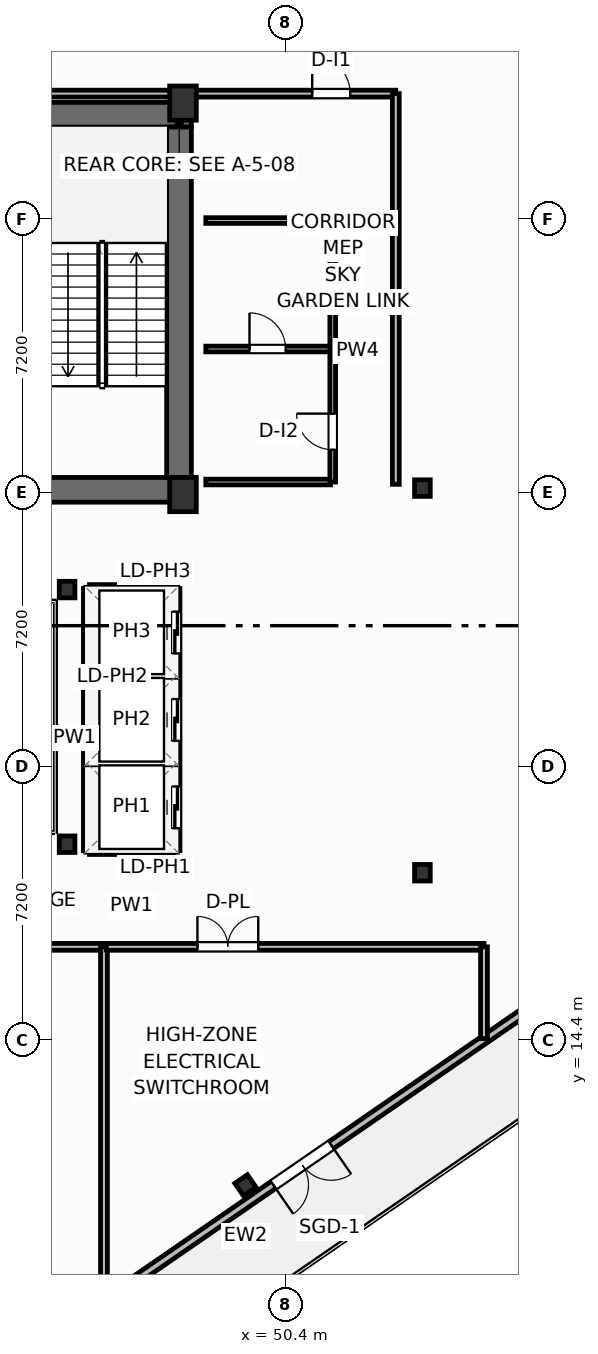
"""IFC4 building model, lengths in metres.
Left out: names, types, materials, properties, quantities, classifications, styles, units other than length and angle.
Written with IfcOpenShell. Run it as: python <this file> out.ifc"""

import sys

from ifc_helpers import new_model, si_unit, direction, frame, frame_2d, origin, origin_2d, place, context, subcontext, project, spatial, rectangle, i_section, extrude, element, fill, save


model = new_model("IFC4")
c1 = context("Model", 3, precision=1e-05, world=origin(), true_north=direction((0.0, 1.0)))
c2 = subcontext(c1, "Body", "Model", "MODEL_VIEW")
j1 = project(units=[si_unit("LENGTHUNIT", "METRE"), si_unit("PLANEANGLEUNIT", "RADIAN")], contexts=[c1])
p1 = place(None, origin())
s1 = spatial("IfcSite", under=j1, at=p1, CompositionType="ELEMENT")
p2 = place(p1, origin())
s2 = spatial("IfcBuilding", under=s1, at=p2, CompositionType="ELEMENT")
p3 = place(p2, frame((0.0, 0.0, 253.4)))
s3 = spatial("IfcBuildingStorey", under=s2, at=p3, CompositionType="ELEMENT", Elevation=253.4)
for number, where, z_axis, x_axis in (
    (1, (47.7, 28.75, 0.0), (0.0, 0.0, 1.0), (1.0, 0.0, 0.0)),
    (2, (47.7, 39.05, 0.0), (0.0, 0.0, 1.0), (1.0, 0.0, 0.0)),
):
    element("IfcColumn", number, at=place(p3, frame(where, z_axis=z_axis, x_axis=x_axis)), inside=s3, PredefinedType="COLUMN", context=c2, shape_type="SweptSolid", body=[
        extrude(rectangle(XDim=0.7, YDim=0.9, at=origin_2d()), origin(), (0.0, 0.0, 1.0), 4.8),
    ])
for number, where, z_axis, x_axis in (
    (3, (44.65, 19.55, 0.0), (0.0, 0.0, 1.0), (1.0, 0.0, 0.0)),
    (4, (44.65, 26.25, 0.0), (0.0, 0.0, 1.0), (1.0, 0.0, 0.0)),
    (5, (54.0, 18.8, 0.0), (0.0, 0.0, 1.0), (1.0, 0.0, 0.0)),
    (6, (54.0, 28.92, 0.0), (0.0, 0.0, 1.0), (1.0, 0.0, 0.0)),
):
    element("IfcColumn", number, at=place(p3, frame(where, z_axis=z_axis, x_axis=x_axis)), inside=s3, PredefinedType="COLUMN", context=c2, shape_type="SweptSolid", body=[
        extrude(i_section(OverallWidth=0.412, OverallDepth=0.435, WebThickness=0.036, FlangeThickness=0.057, FilletRadius=0.025, at=origin_2d()), origin(), (0.0, 0.0, 1.0), 4.8),
    ])
p4 = place(p3, frame((30.48, 38.745, 0.0), z_axis=(0.0, 0.0, 1.0), x_axis=(1.0, 0.0, 0.0)))
e7 = element("IfcWall", 7, at=p4, inside=s3, PredefinedType="SHEAR", context=c2, shape_type="SweptSolid", body=[
    extrude(rectangle(XDim=17.44, YDim=0.65, at=frame_2d((8.72, 0.0))), origin(), (0.0, 0.0, 1.0), 4.55),
])
p5 = place(p3, frame((47.595, 29.2, 0.0), z_axis=(0.0, 0.0, 1.0), x_axis=(0.0, 1.0, 0.0)))
e8 = element("IfcWall", 8, at=p5, inside=s3, PredefinedType="SHEAR", context=c2, shape_type="SweptSolid", body=[
    extrude(rectangle(XDim=9.22, YDim=0.65, at=frame_2d((4.61, 0.0))), origin(), (0.0, 0.0, 1.0), 4.55),
])
p6 = place(p3, frame((43.6, 28.875, 0.0), z_axis=(0.0, 0.0, 1.0), x_axis=(1.0, 0.0, 0.0)))
e9 = element("IfcWall", 9, at=p6, inside=s3, PredefinedType="SHEAR", context=c2, shape_type="SweptSolid", body=[
    extrude(rectangle(XDim=4.32, YDim=0.65, at=frame_2d((2.16, 0.0))), origin(), (0.0, 0.0, 1.0), 4.55),
])
p7 = place(p3, frame((49.343, 10.575, -0.32), z_axis=(0.0, 0.0, 1.0), x_axis=(0.823532597628, 0.567268949127, 0.0)))
e10 = element("IfcColumn", 10, at=p7, inside=s3, PredefinedType="COLUMN", context=c2, shape_type="SweptSolid", body=[
    extrude(i_section(OverallWidth=0.401, OverallDepth=0.399, WebThickness=0.025, FlangeThickness=0.04, FilletRadius=0.022, at=origin_2d()), origin(), (0.0, 0.0, 1.0), 5.12),
])
p8 = place(p3, frame((71.07, 25.043, 0.0), z_axis=(0.0, 0.0, 1.0), x_axis=(-0.82353435434, -0.567266398812, 0.0)))
e11 = element("IfcWall", 11, at=p8, inside=s3, PredefinedType="SOLIDWALL", context=c2, shape_type="SweptSolid", body=[
    extrude(rectangle(XDim=52.2, YDim=0.22, at=frame_2d((26.1, 0.0))), origin(), (0.0, 0.0, 1.0), 3.83),
])
p9 = place(p8, frame((23.64, 0.0, 0.0)))
e12 = element("IfcOpeningElement", 12, at=p9, cuts=e11, PredefinedType="OPENING", context=c2, shape_type="SweptSolid", body=[
    extrude(rectangle(XDim=1.85, YDim=2.3, at=frame_2d((0.925, 1.15))), frame((0.0, 0.12, 0.0), z_axis=(0.0, -1.0, 0.0), x_axis=(1.0, 0.0, 0.0)), (0.0, 0.0, 1.0), 0.24),
])
p10 = place(p8, frame((0.55, 0.0, 0.75)))
e13 = element("IfcOpeningElement", 13, at=p10, cuts=e11, PredefinedType="OPENING", context=c2, shape_type="SweptSolid", body=[
    extrude(rectangle(XDim=1.85, YDim=1.75, at=frame_2d((0.925, 0.875))), frame((0.0, 0.12, 0.0), z_axis=(0.0, -1.0, 0.0), x_axis=(1.0, 0.0, 0.0)), (0.0, 0.0, 1.0), 0.24),
])
p11 = place(p8, frame((49.8, 0.0, 0.75)))
e14 = element("IfcOpeningElement", 14, at=p11, cuts=e11, PredefinedType="OPENING", context=c2, shape_type="SweptSolid", body=[
    extrude(rectangle(XDim=1.85, YDim=1.75, at=frame_2d((0.925, 0.875))), frame((0.0, 0.12, 0.0), z_axis=(0.0, -1.0, 0.0), x_axis=(1.0, 0.0, 0.0)), (0.0, 0.0, 1.0), 0.24),
])
p12 = place(p3, frame((7.331, 25.557, 0.0), z_axis=(0.0, 0.0, 1.0), x_axis=(0.823530664362, 0.567271755735, 0.0)))
e15 = element("IfcWall", 15, at=p12, inside=s3, PredefinedType="SOLIDWALL", context=c2, shape_type="SweptSolid", body=[
    extrude(rectangle(XDim=52.2, YDim=0.22, at=frame_2d((26.1, 0.0))), origin(), (0.0, 0.0, 1.0), 3.83),
])
p13 = place(p12, frame((28.025, 0.0, 0.0)))
e16 = element("IfcOpeningElement", 16, at=p13, cuts=e15, PredefinedType="OPENING", context=c2, shape_type="SweptSolid", body=[
    extrude(rectangle(XDim=1.85, YDim=2.3, at=frame_2d((0.925, 1.15))), frame((0.0, 0.12, 0.0), z_axis=(0.0, -1.0, 0.0), x_axis=(1.0, 0.0, 0.0)), (0.0, 0.0, 1.0), 0.24),
])
p14 = place(p12, frame((0.55, 0.0, 0.75)))
e17 = element("IfcOpeningElement", 17, at=p14, cuts=e15, PredefinedType="OPENING", context=c2, shape_type="SweptSolid", body=[
    extrude(rectangle(XDim=1.85, YDim=1.75, at=frame_2d((0.925, 0.875))), frame((0.0, 0.12, 0.0), z_axis=(0.0, -1.0, 0.0), x_axis=(1.0, 0.0, 0.0)), (0.0, 0.0, 1.0), 0.24),
])
p15 = place(p12, frame((49.8, 0.0, 0.75)))
e18 = element("IfcOpeningElement", 18, at=p15, cuts=e15, PredefinedType="OPENING", context=c2, shape_type="SweptSolid", body=[
    extrude(rectangle(XDim=1.85, YDim=1.75, at=frame_2d((0.925, 0.875))), frame((0.0, 0.12, 0.0), z_axis=(0.0, -1.0, 0.0), x_axis=(1.0, 0.0, 0.0)), (0.0, 0.0, 1.0), 0.24),
])
p16 = place(p3, frame((33.68, 16.85, 0.0), z_axis=(0.0, 0.0, 1.0), x_axis=(1.0, 0.0, 0.0)))
e19 = element("IfcWall", 19, at=p16, inside=s3, PredefinedType="PARTITIONING", context=c2, shape_type="SweptSolid", body=[
    extrude(rectangle(XDim=11.94, YDim=0.18, at=frame_2d((5.97, 0.0))), origin(), (0.0, 0.0, 1.0), 4.55),
])
p17 = place(p16, frame((2.4, 0.0, 0.0)))
e20 = element("IfcOpeningElement", 20, at=p17, cuts=e19, PredefinedType="OPENING", context=c2, shape_type="SweptSolid", body=[
    extrude(rectangle(XDim=1.6, YDim=2.05, at=frame_2d((0.8, 1.025))), frame((0.0, 0.1, 0.0), z_axis=(0.0, -1.0, 0.0), x_axis=(1.0, 0.0, 0.0)), (0.0, 0.0, 1.0), 0.2),
])
p18 = place(p3, frame((45.62, 7.55, 0.0), z_axis=(0.0, 0.0, 1.0), x_axis=(0.0, 1.0, 0.0)))
e21 = element("IfcWall", 21, at=p18, inside=s3, PredefinedType="PARTITIONING", context=c2, shape_type="SweptSolid", body=[
    extrude(rectangle(XDim=9.301, YDim=0.18, at=frame_2d((4.65, 0.0))), origin(), (0.0, 0.0, 1.0), 4.55),
])
p19 = place(p3, frame((45.68, 16.85, 0.0), z_axis=(0.0, 0.0, 1.0), x_axis=(1.0, 0.0, 0.0)))
e22 = element("IfcWall", 22, at=p19, inside=s3, PredefinedType="PARTITIONING", context=c2, shape_type="SweptSolid", body=[
    extrude(rectangle(XDim=9.94, YDim=0.18, at=frame_2d((4.97, 0.0))), origin(), (0.0, 0.0, 1.0), 4.55),
])
p20 = place(p19, frame((2.4, 0.0, 0.0)))
e23 = element("IfcOpeningElement", 23, at=p20, cuts=e22, PredefinedType="OPENING", context=c2, shape_type="SweptSolid", body=[
    extrude(rectangle(XDim=1.6, YDim=2.05, at=frame_2d((0.8, 1.025))), frame((0.0, 0.1, 0.0), z_axis=(0.0, -1.0, 0.0), x_axis=(1.0, 0.0, 0.0)), (0.0, 0.0, 1.0), 0.2),
])
p21 = place(p3, frame((55.62, 14.438, 0.0), z_axis=(0.0, 0.0, 1.0), x_axis=(0.0, 1.0, 0.0)))
e24 = element("IfcWall", 24, at=p21, inside=s3, PredefinedType="PARTITIONING", context=c2, shape_type="SweptSolid", body=[
    extrude(rectangle(XDim=2.412, YDim=0.18, at=frame_2d((1.206, 0.0))), origin(), (0.0, 0.0, 1.0), 4.55),
])
p22 = place(p3, frame((20.0, 39.3, 0.0), z_axis=(0.0, 0.0, 1.0), x_axis=(1.0, 0.0, 0.0)))
e25 = element("IfcWall", 25, at=p22, inside=s3, PredefinedType="PARTITIONING", context=c2, shape_type="SweptSolid", body=[
    extrude(rectangle(XDim=33.3, YDim=0.18, at=frame_2d((16.65, 0.0))), origin(), (0.0, 0.0, 1.0), 3.839),
])
p23 = place(p22, frame((31.1, 0.0, 0.0)))
e26 = element("IfcOpeningElement", 26, at=p23, cuts=e25, PredefinedType="OPENING", context=c2, shape_type="SweptSolid", body=[
    extrude(rectangle(XDim=1.0, YDim=2.05, at=frame_2d((0.5, 1.025))), frame((0.0, 0.1, 0.0), z_axis=(0.0, -1.0, 0.0), x_axis=(1.0, 0.0, 0.0)), (0.0, 0.0, 1.0), 0.2),
])
p24 = place(p3, frame((53.3, 29.02, 0.0), z_axis=(0.0, 0.0, 1.0), x_axis=(0.0, 1.0, 0.0)))
e27 = element("IfcWall", 27, at=p24, inside=s3, PredefinedType="PARTITIONING", context=c2, shape_type="SweptSolid", body=[
    extrude(rectangle(XDim=10.28, YDim=0.18, at=frame_2d((5.14, 0.0))), origin(), (0.0, 0.0, 1.0), 4.55),
])
p25 = place(p3, frame((48.3, 32.58, 0.0), z_axis=(0.0, 0.0, 1.0), x_axis=(1.0, 0.0, 0.0)))
e28 = element("IfcWall", 28, at=p25, inside=s3, PredefinedType="PARTITIONING", context=c2, shape_type="SweptSolid", body=[
    extrude(rectangle(XDim=3.28, YDim=0.15, at=frame_2d((1.64, 0.0))), origin(), (0.0, 0.0, 1.0), 4.55),
])
p26 = place(p25, frame((1.15, 0.0, 0.0)))
e29 = element("IfcOpeningElement", 29, at=p26, cuts=e28, PredefinedType="OPENING", context=c2, shape_type="SweptSolid", body=[
    extrude(rectangle(XDim=0.95, YDim=2.05, at=frame_2d((0.475, 1.025))), frame((0.0, 0.085, 0.0), z_axis=(0.0, -1.0, 0.0), x_axis=(1.0, 0.0, 0.0)), (0.0, 0.0, 1.0), 0.17),
])
p27 = place(p3, frame((48.3, 29.08, 0.0), z_axis=(0.0, 0.0, 1.0), x_axis=(1.0, 0.0, 0.0)))
e30 = element("IfcWall", 30, at=p27, inside=s3, PredefinedType="PARTITIONING", context=c2, shape_type="SweptSolid", body=[
    extrude(rectangle(XDim=3.28, YDim=0.15, at=frame_2d((1.64, 0.0))), origin(), (0.0, 0.0, 1.0), 3.762),
])
p28 = place(p3, frame((48.3, 35.96, 0.0), z_axis=(0.0, 0.0, 1.0), x_axis=(1.0, 0.0, 0.0)))
e31 = element("IfcWall", 31, at=p28, inside=s3, PredefinedType="PARTITIONING", context=c2, shape_type="SweptSolid", body=[
    extrude(rectangle(XDim=3.28, YDim=0.15, at=frame_2d((1.64, 0.0))), origin(), (0.0, 0.0, 1.0), 4.55),
])
p29 = place(p3, frame((51.64, 29.08, 0.0), z_axis=(0.0, 0.0, 1.0), x_axis=(0.0, 1.0, 0.0)))
e32 = element("IfcWall", 32, at=p29, inside=s3, PredefinedType="PARTITIONING", context=c2, shape_type="SweptSolid", body=[
    extrude(rectangle(XDim=6.88, YDim=0.15, at=frame_2d((3.44, 0.0))), origin(), (0.0, 0.0, 1.0), 4.55),
])
p30 = place(p29, frame((0.85, 0.0, 0.0)))
e33 = element("IfcOpeningElement", 33, at=p30, cuts=e32, PredefinedType="OPENING", context=c2, shape_type="SweptSolid", body=[
    extrude(rectangle(XDim=0.95, YDim=2.05, at=frame_2d((0.475, 1.025))), frame((0.0, 0.085, 0.0), z_axis=(0.0, -1.0, 0.0), x_axis=(1.0, 0.0, 0.0)), (0.0, 0.0, 1.0), 0.17),
])
for number, where, z_axis, x_axis in (
    (34, (45.24, 21.675, 0.0), (0.0, 0.0, 1.0), (1.0, 0.0, 0.0)),
    (35, (45.24, 23.975, 0.0), (0.0, 0.0, 1.0), (1.0, 0.0, 0.0)),
):
    element("IfcWall", number, at=place(p3, frame(where, z_axis=z_axis, x_axis=x_axis)), inside=s3, PredefinedType="PARTITIONING", context=c2, shape_type="SweptSolid", body=[
        extrude(rectangle(XDim=2.22, YDim=0.2, at=frame_2d((1.11, 0.0))), origin(), (0.0, 0.0, 1.0), 4.55),
    ])
p31 = place(p3, frame((45.24, 19.38, 0.0), z_axis=(0.0, 0.0, 1.0), x_axis=(1.0, 0.0, 0.0)))
e36 = element("IfcWall", 36, at=p31, inside=s3, PredefinedType="PARTITIONING", context=c2, shape_type="SweptSolid", body=[
    extrude(rectangle(XDim=2.22, YDim=0.2, at=frame_2d((1.11, 0.0))), origin(), (0.0, 0.0, 1.0), 3.762),
])
p32 = place(p3, frame((45.24, 26.28, 0.0), z_axis=(0.0, 0.0, 1.0), x_axis=(1.0, 0.0, 0.0)))
e37 = element("IfcWall", 37, at=p32, inside=s3, PredefinedType="PARTITIONING", context=c2, shape_type="SweptSolid", body=[
    extrude(rectangle(XDim=2.22, YDim=0.2, at=frame_2d((1.11, 0.0))), origin(), (0.0, 0.0, 1.0), 4.55),
])
p33 = place(p3, frame((45.18, 19.38, 0.0), z_axis=(0.0, 0.0, 1.0), x_axis=(0.0, 1.0, 0.0)))
e38 = element("IfcWall", 38, at=p33, inside=s3, PredefinedType="PARTITIONING", context=c2, shape_type="SweptSolid", body=[
    extrude(rectangle(XDim=6.9, YDim=0.2, at=frame_2d((3.45, 0.0))), origin(), (0.0, 0.0, 1.0), 4.55),
])
p34 = place(p3, frame((47.52, 19.38, 0.0), z_axis=(0.0, 0.0, 1.0), x_axis=(0.0, 1.0, 0.0)))
e39 = element("IfcWall", 39, at=p34, inside=s3, PredefinedType="PARTITIONING", context=c2, shape_type="SweptSolid", body=[
    extrude(rectangle(XDim=6.9, YDim=0.2, at=frame_2d((3.45, 0.0))), origin(), (0.0, 0.0, 1.0), 4.55),
])
p35 = place(p34, frame((0.59, 0.0, 0.0)))
e40 = element("IfcOpeningElement", 40, at=p35, cuts=e39, PredefinedType="OPENING", context=c2, shape_type="SweptSolid", body=[
    extrude(rectangle(XDim=1.1, YDim=2.15, at=frame_2d((0.55, 1.075))), frame((0.0, 0.11, 0.0), z_axis=(0.0, -1.0, 0.0), x_axis=(1.0, 0.0, 0.0)), (0.0, 0.0, 1.0), 0.22),
])
p36 = place(p34, frame((2.89, 0.0, 0.0)))
e41 = element("IfcOpeningElement", 41, at=p36, cuts=e39, PredefinedType="OPENING", context=c2, shape_type="SweptSolid", body=[
    extrude(rectangle(XDim=1.1, YDim=2.15, at=frame_2d((0.55, 1.075))), frame((0.0, 0.11, 0.0), z_axis=(0.0, -1.0, 0.0), x_axis=(1.0, 0.0, 0.0)), (0.0, 0.0, 1.0), 0.22),
])
p37 = place(p34, frame((5.19, 0.0, 0.0)))
e42 = element("IfcOpeningElement", 42, at=p37, cuts=e39, PredefinedType="OPENING", context=c2, shape_type="SweptSolid", body=[
    extrude(rectangle(XDim=1.1, YDim=2.15, at=frame_2d((0.55, 1.075))), frame((0.0, 0.11, 0.0), z_axis=(0.0, -1.0, 0.0), x_axis=(1.0, 0.0, 0.0)), (0.0, 0.0, 1.0), 0.22),
])
p38 = place(p9, origin())
e43 = element("IfcDoor", 43, at=p38, inside=s3, OperationType="DOUBLE_DOOR_SINGLE_SWING", PredefinedType="DOOR", context=c2, shape_type="SweptSolid", body=[
    extrude(rectangle(XDim=1.85, YDim=2.3, at=frame_2d((0.925, 1.15))), frame((0.0, 0.025, 0.0), z_axis=(0.0, -1.0, 0.0), x_axis=(1.0, 0.0, 0.0)), (0.0, 0.0, 1.0), 0.05),
])
fill(e12, e43)
p39 = place(p20, origin())
e44 = element("IfcDoor", 44, at=p39, inside=s3, OperationType="DOUBLE_DOOR_SINGLE_SWING", PredefinedType="DOOR", context=c2, shape_type="SweptSolid", body=[
    extrude(rectangle(XDim=1.6, YDim=2.05, at=frame_2d((0.8, 1.025))), frame((0.0, 0.025, 0.0), z_axis=(0.0, -1.0, 0.0), x_axis=(1.0, 0.0, 0.0)), (0.0, 0.0, 1.0), 0.05),
])
fill(e23, e44)
p40 = place(p23, origin())
e45 = element("IfcDoor", 45, at=p40, inside=s3, OperationType="SINGLE_SWING_LEFT", PredefinedType="DOOR", context=c2, shape_type="SweptSolid", body=[
    extrude(rectangle(XDim=1.0, YDim=2.05, at=frame_2d((0.5, 1.025))), frame((0.0, 0.025, 0.0), z_axis=(0.0, -1.0, 0.0), x_axis=(1.0, 0.0, 0.0)), (0.0, 0.0, 1.0), 0.05),
])
fill(e26, e45)
p41 = place(p26, origin())
e46 = element("IfcDoor", 46, at=p41, inside=s3, OperationType="SINGLE_SWING_LEFT", PredefinedType="DOOR", context=c2, shape_type="SweptSolid", body=[
    extrude(rectangle(XDim=0.95, YDim=2.05, at=frame_2d((0.475, 1.025))), frame((0.0, 0.025, 0.0), z_axis=(0.0, -1.0, 0.0), x_axis=(1.0, 0.0, 0.0)), (0.0, 0.0, 1.0), 0.05),
])
fill(e29, e46)
p42 = place(p30, origin())
e47 = element("IfcDoor", 47, at=p42, inside=s3, OperationType="SINGLE_SWING_RIGHT", PredefinedType="DOOR", context=c2, shape_type="SweptSolid", body=[
    extrude(rectangle(XDim=0.95, YDim=2.05, at=frame_2d((0.475, 1.025))), frame((0.0, 0.025, 0.0), z_axis=(0.0, -1.0, 0.0), x_axis=(1.0, 0.0, 0.0)), (0.0, 0.0, 1.0), 0.05),
])
fill(e33, e47)
p43 = place(p35, origin())
e48 = element("IfcDoor", 48, at=p43, inside=s3, OperationType="SLIDING_TO_LEFT", PredefinedType="DOOR", context=c2, shape_type="SweptSolid", body=[
    extrude(rectangle(XDim=1.1, YDim=2.15, at=frame_2d((0.55, 1.075))), frame((0.0, 0.025, 0.0), z_axis=(0.0, -1.0, 0.0), x_axis=(1.0, 0.0, 0.0)), (0.0, 0.0, 1.0), 0.05),
])
fill(e40, e48)
p44 = place(p36, origin())
e49 = element("IfcDoor", 49, at=p44, inside=s3, OperationType="SLIDING_TO_LEFT", PredefinedType="DOOR", context=c2, shape_type="SweptSolid", body=[
    extrude(rectangle(XDim=1.1, YDim=2.15, at=frame_2d((0.55, 1.075))), frame((0.0, 0.025, 0.0), z_axis=(0.0, -1.0, 0.0), x_axis=(1.0, 0.0, 0.0)), (0.0, 0.0, 1.0), 0.05),
])
fill(e41, e49)
p45 = place(p37, origin())
e50 = element("IfcDoor", 50, at=p45, inside=s3, OperationType="SLIDING_TO_LEFT", PredefinedType="DOOR", context=c2, shape_type="SweptSolid", body=[
    extrude(rectangle(XDim=1.1, YDim=2.15, at=frame_2d((0.55, 1.075))), frame((0.0, 0.025, 0.0), z_axis=(0.0, -1.0, 0.0), x_axis=(1.0, 0.0, 0.0)), (0.0, 0.0, 1.0), 0.05),
])
fill(e42, e50)
save(model, sys.argv[1])
